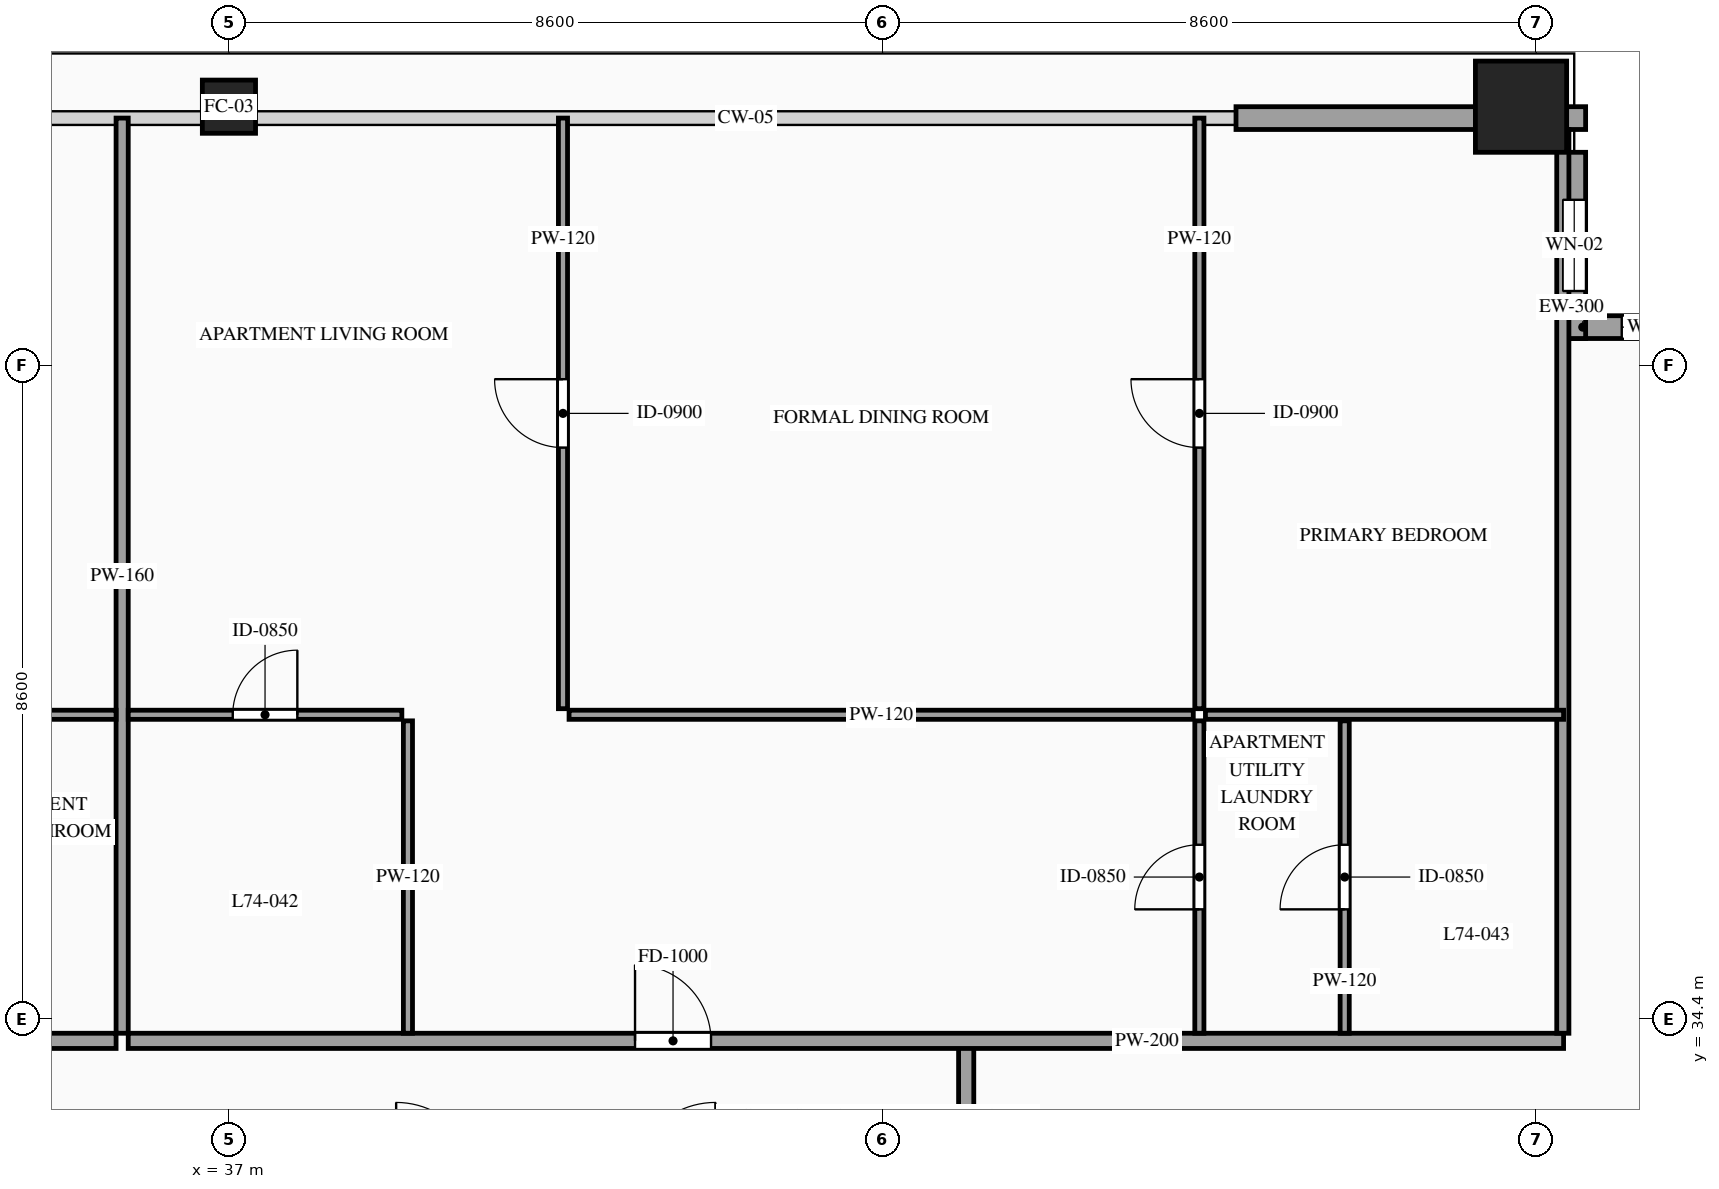
"""IFC4 building model, lengths in metres.
Left out: names, types, materials, properties, quantities, classifications, styles, units other than length and angle.
Written with IfcOpenShell. Run it as: python <this file> out.ifc"""

import sys

from ifc_helpers import new_model, si_unit, direction, frame, frame_2d, origin, origin_2d, place, context, subcontext, project, spatial, rectangle, hollow_rectangle, extrude, source, transform, mapped, element, fill, save


model = new_model("IFC4")
c1 = context("Model", 3, precision=1e-05, world=origin(), true_north=direction((0.0, 1.0)))
c2 = subcontext(c1, "Body", "Model", "MODEL_VIEW")
j1 = project(units=[si_unit("LENGTHUNIT", "METRE"), si_unit("PLANEANGLEUNIT", "RADIAN")], contexts=[c1])
p1 = place(None, origin())
s1 = spatial("IfcSite", under=j1, at=p1, CompositionType="ELEMENT")
p2 = place(p1, origin())
s2 = spatial("IfcBuilding", under=s1, at=p2, CompositionType="ELEMENT")
p3 = place(p2, frame((0.0, 0.0, 278.6)))
s3 = spatial("IfcBuildingStorey", under=s2, at=p3, CompositionType="ELEMENT", Elevation=278.6)
m1 = source(origin(), c2, "Body", "SweptSolid", [
    extrude(hollow_rectangle(XDim=0.7, YDim=0.7, WallThickness=0.032, at=origin_2d()), origin(), (0.0, 0.0, 1.0), 3.5),
])
p4 = place(p3, frame((37.0, 46.4, 0.0), z_axis=(0.0, 0.0, 1.0), x_axis=(1.0, 0.0, 0.0)))
e1 = element("IfcColumn", 1, at=p4, inside=s3, PredefinedType="COLUMN", context=c2, shape_type="MappedRepresentation", body=[
    mapped(m1, transform((0.0, 0.0, 0.0), scale=1.0)),
])
m2 = source(origin(), c2, "Body", "SweptSolid", [
    extrude(hollow_rectangle(XDim=1.2, YDim=1.2, WallThickness=0.055, at=origin_2d()), origin(), (0.0, 0.0, 1.0), 3.5),
])
p5 = place(p3, frame((54.0, 46.4, 0.0), z_axis=(0.0, 0.0, 1.0), x_axis=(1.0, 0.0, 0.0)))
e2 = element("IfcColumn", 2, at=p5, inside=s3, PredefinedType="COLUMN", context=c2, shape_type="MappedRepresentation", body=[
    mapped(m2, transform((0.0, 0.0, 0.0), scale=1.0)),
])
p6 = place(p3, frame((57.0, 43.5, 0.0), z_axis=(0.0, 0.0, 1.0), x_axis=(-1.0, 0.0, 0.0)))
e3 = element("IfcWall", 3, at=p6, inside=s3, PredefinedType="SOLIDWALL", context=c2, shape_type="SweptSolid", body=[
    extrude(rectangle(XDim=2.45, YDim=0.3, at=frame_2d((1.225, 0.0))), origin(), (0.0, 0.0, 1.0), 3.28),
])
p7 = place(p6, frame((0.775, 0.0, 0.85)))
e4 = element("IfcOpeningElement", 4, at=p7, cuts=e3, PredefinedType="OPENING", context=c2, shape_type="SweptSolid", body=[
    extrude(rectangle(XDim=0.9, YDim=1.5, at=frame_2d((0.45, 0.75))), frame((0.0, 0.165, 0.0), z_axis=(0.0, -1.0, 0.0), x_axis=(1.0, 0.0, 0.0)), (0.0, 0.0, 1.0), 0.33),
])
p8 = place(p3, frame((54.7, 43.35, 0.0), z_axis=(0.0, 0.0, 1.0), x_axis=(0.0, 1.0, 0.0)))
e5 = element("IfcWall", 5, at=p8, inside=s3, PredefinedType="SOLIDWALL", context=c2, shape_type="SweptSolid", body=[
    extrude(rectangle(XDim=2.45, YDim=0.3, at=frame_2d((1.225, 0.0))), origin(), (0.0, 0.0, 1.0), 3.28),
])
p9 = place(p8, frame((0.625, 0.0, 0.85)))
e6 = element("IfcOpeningElement", 6, at=p9, cuts=e5, PredefinedType="OPENING", context=c2, shape_type="SweptSolid", body=[
    extrude(rectangle(XDim=1.2, YDim=2.1, at=frame_2d((0.6, 1.05))), frame((0.0, 0.165, 0.0), z_axis=(0.0, -1.0, 0.0), x_axis=(1.0, 0.0, 0.0)), (0.0, 0.0, 1.0), 0.33),
])
m3 = source(origin(), c2, "Body", "SweptSolid", [
    extrude(rectangle(XDim=0.25, YDim=0.3, at=frame_2d((0.125, 0.0))), origin(), (0.0, 0.0, 1.0), 3.28),
])
p10 = place(p3, frame((54.6, 46.25, 0.0), z_axis=(0.0, 0.0, 1.0), x_axis=(1.0, 0.0, 0.0)))
e7 = element("IfcWall", 7, at=p10, inside=s3, PredefinedType="SOLIDWALL", context=c2, shape_type="MappedRepresentation", body=[
    mapped(m3, transform((0.0, 0.0, 0.0), scale=1.0)),
])
m4 = source(origin(), c2, "Body", "SweptSolid", [
    extrude(rectangle(XDim=3.15, YDim=0.3, at=frame_2d((1.575, 0.0))), origin(), (0.0, 0.0, 1.0), 2.835),
])
p11 = place(p3, frame((50.25, 46.25, 0.0), z_axis=(0.0, 0.0, 1.0), x_axis=(1.0, 0.0, 0.0)))
e8 = element("IfcWall", 8, at=p11, inside=s3, PredefinedType="SOLIDWALL", context=c2, shape_type="MappedRepresentation", body=[
    mapped(m4, transform((0.0, 0.0, 0.0), scale=1.0)),
])
m5 = source(origin(), c2, "Body", "SweptSolid", [
    extrude(rectangle(XDim=1.7, YDim=0.2, at=frame_2d((0.85, 0.0))), origin(), (0.0, 0.0, 1.0), 3.28),
])
p12 = place(p3, frame((46.7, 32.35, 0.0), z_axis=(0.0, 0.0, 1.0), x_axis=(0.0, 1.0, 0.0)))
e9 = element("IfcWall", 9, at=p12, inside=s3, PredefinedType="PARTITIONING", context=c2, shape_type="MappedRepresentation", body=[
    mapped(m5, transform((0.0, 0.0, 0.0), scale=1.0)),
])
p13 = place(p3, frame((19.44, 34.11, 0.0), z_axis=(0.0, 0.0, 1.0), x_axis=(1.0, 0.0, 0.0)))
e10 = element("IfcWall", 10, at=p13, inside=s3, PredefinedType="PARTITIONING", context=c2, shape_type="SweptSolid", body=[
    extrude(rectangle(XDim=16.075, YDim=0.2, at=frame_2d((8.038, 0.0))), origin(), (0.0, 0.0, 1.0), 3.28),
])
p14 = place(p13, frame((6.982, 0.0, 0.0)))
e11 = element("IfcOpeningElement", 11, at=p14, cuts=e10, PredefinedType="OPENING", context=c2, shape_type="SweptSolid", body=[
    extrude(rectangle(XDim=1.0, YDim=2.2, at=frame_2d((0.5, 1.1))), frame((0.0, 0.115, 0.0), z_axis=(0.0, -1.0, 0.0), x_axis=(1.0, 0.0, 0.0)), (0.0, 0.0, 1.0), 0.23),
])
m6 = source(origin(), c2, "Body", "SweptSolid", [
    extrude(rectangle(XDim=12.04, YDim=0.16, at=frame_2d((6.02, 0.0))), origin(), (0.0, 0.0, 1.0), 3.28),
])
p15 = place(p3, frame((35.595, 34.21, 0.0), z_axis=(0.0, 0.0, 1.0), x_axis=(0.0, 1.0, 0.0)))
e12 = element("IfcWall", 12, at=p15, inside=s3, PredefinedType="PARTITIONING", context=c2, shape_type="MappedRepresentation", body=[
    mapped(m6, transform((0.0, 0.0, 0.0), scale=1.0)),
])
m7 = source(origin(), c2, "Body", "SweptSolid", [
    extrude(rectangle(XDim=4.712, YDim=0.12, at=frame_2d((2.356, 0.0))), origin(), (0.0, 0.0, 1.0), 3.28),
])
p16 = place(p3, frame((30.803, 38.4, 0.0), z_axis=(0.0, 0.0, 1.0), x_axis=(1.0, 0.0, 0.0)))
e13 = element("IfcWall", 13, at=p16, inside=s3, PredefinedType="PARTITIONING", context=c2, shape_type="MappedRepresentation", body=[
    mapped(m7, transform((0.0, 0.0, 0.0), scale=1.0)),
])
p17 = place(p3, frame((35.675, 34.11, 0.0), z_axis=(0.0, 0.0, 1.0), x_axis=(1.0, 0.0, 0.0)))
e14 = element("IfcWall", 14, at=p17, inside=s3, PredefinedType="PARTITIONING", context=c2, shape_type="SweptSolid", body=[
    extrude(rectangle(XDim=18.885, YDim=0.2, at=frame_2d((9.442, 0.0))), origin(), (0.0, 0.0, 1.0), 3.28),
])
p18 = place(p17, frame((6.668, 0.0, 0.0)))
e15 = element("IfcOpeningElement", 15, at=p18, cuts=e14, PredefinedType="OPENING", context=c2, shape_type="SweptSolid", body=[
    extrude(rectangle(XDim=1.0, YDim=2.2, at=frame_2d((0.5, 1.1))), frame((0.0, 0.115, 0.0), z_axis=(0.0, -1.0, 0.0), x_axis=(1.0, 0.0, 0.0)), (0.0, 0.0, 1.0), 0.23),
])
m8 = source(origin(), c2, "Body", "SweptSolid", [
    extrude(rectangle(XDim=11.89, YDim=0.16, at=frame_2d((5.945, 0.0))), origin(), (0.0, 0.0, 1.0), 3.28),
])
p19 = place(p3, frame((54.55, 34.21, 0.0), z_axis=(0.0, 0.0, 1.0), x_axis=(0.0, 1.0, 0.0)))
e16 = element("IfcWall", 16, at=p19, inside=s3, PredefinedType="PARTITIONING", context=c2, shape_type="MappedRepresentation", body=[
    mapped(m8, transform((0.0, 0.0, 0.0), scale=1.0)),
])
p20 = place(p3, frame((35.675, 38.4, 0.0), z_axis=(0.0, 0.0, 1.0), x_axis=(1.0, 0.0, 0.0)))
e17 = element("IfcWall", 17, at=p20, inside=s3, PredefinedType="PARTITIONING", context=c2, shape_type="SweptSolid", body=[
    extrude(rectangle(XDim=3.6, YDim=0.12, at=frame_2d((1.8, 0.0))), origin(), (0.0, 0.0, 1.0), 3.28),
])
p21 = place(p20, frame((1.375, 0.0, 0.0)))
e18 = element("IfcOpeningElement", 18, at=p21, cuts=e17, PredefinedType="OPENING", context=c2, shape_type="SweptSolid", body=[
    extrude(rectangle(XDim=0.85, YDim=2.1, at=frame_2d((0.425, 1.05))), frame((0.0, 0.075, 0.0), z_axis=(0.0, -1.0, 0.0), x_axis=(1.0, 0.0, 0.0)), (0.0, 0.0, 1.0), 0.15),
])
m9 = source(origin(), c2, "Body", "SweptSolid", [
    extrude(rectangle(XDim=4.11, YDim=0.12, at=frame_2d((2.055, 0.0))), origin(), (0.0, 0.0, 1.0), 3.28),
])
p22 = place(p3, frame((39.355, 34.21, 0.0), z_axis=(0.0, 0.0, 1.0), x_axis=(0.0, 1.0, 0.0)))
e19 = element("IfcWall", 19, at=p22, inside=s3, PredefinedType="PARTITIONING", context=c2, shape_type="MappedRepresentation", body=[
    mapped(m9, transform((0.0, 0.0, 0.0), scale=1.0)),
])
p23 = place(p3, frame((51.68, 34.21, 0.0), z_axis=(0.0, 0.0, 1.0), x_axis=(0.0, 1.0, 0.0)))
e20 = element("IfcWall", 20, at=p23, inside=s3, PredefinedType="PARTITIONING", context=c2, shape_type="SweptSolid", body=[
    extrude(rectangle(XDim=4.11, YDim=0.12, at=frame_2d((2.055, 0.0))), origin(), (0.0, 0.0, 1.0), 3.28),
])
p24 = place(p23, frame((1.63, 0.0, 0.0)))
e21 = element("IfcOpeningElement", 21, at=p24, cuts=e20, PredefinedType="OPENING", context=c2, shape_type="SweptSolid", body=[
    extrude(rectangle(XDim=0.85, YDim=2.1, at=frame_2d((0.425, 1.05))), frame((0.0, 0.075, 0.0), z_axis=(0.0, -1.0, 0.0), x_axis=(1.0, 0.0, 0.0)), (0.0, 0.0, 1.0), 0.15),
])
m10 = source(origin(), c2, "Body", "SweptSolid", [
    extrude(rectangle(XDim=4.712, YDim=0.12, at=frame_2d((2.356, 0.0))), origin(), (0.0, 0.0, 1.0), 3.28),
])
p25 = place(p3, frame((49.848, 38.4, 0.0), z_axis=(0.0, 0.0, 1.0), x_axis=(1.0, 0.0, 0.0)))
e22 = element("IfcWall", 22, at=p25, inside=s3, PredefinedType="PARTITIONING", context=c2, shape_type="MappedRepresentation", body=[
    mapped(m10, transform((0.0, 0.0, 0.0), scale=1.0)),
])
p26 = place(p3, frame((49.768, 38.48, 0.0), z_axis=(0.0, 0.0, 1.0), x_axis=(0.0, 1.0, 0.0)))
e23 = element("IfcWall", 23, at=p26, inside=s3, PredefinedType="PARTITIONING", context=c2, shape_type="SweptSolid", body=[
    extrude(rectangle(XDim=7.77, YDim=0.12, at=frame_2d((3.885, 0.0))), origin(), (0.0, 0.0, 1.0), 3.28),
])
p27 = place(p26, frame((3.435, 0.0, 0.0)))
e24 = element("IfcOpeningElement", 24, at=p27, cuts=e23, PredefinedType="OPENING", context=c2, shape_type="SweptSolid", body=[
    extrude(rectangle(XDim=0.9, YDim=2.15, at=frame_2d((0.45, 1.075))), frame((0.0, 0.075, 0.0), z_axis=(0.0, -1.0, 0.0), x_axis=(1.0, 0.0, 0.0)), (0.0, 0.0, 1.0), 0.15),
])
p28 = place(p3, frame((49.768, 34.21, 0.0), z_axis=(0.0, 0.0, 1.0), x_axis=(0.0, 1.0, 0.0)))
e25 = element("IfcWall", 25, at=p28, inside=s3, PredefinedType="PARTITIONING", context=c2, shape_type="SweptSolid", body=[
    extrude(rectangle(XDim=4.11, YDim=0.12, at=frame_2d((2.055, 0.0))), origin(), (0.0, 0.0, 1.0), 3.28),
])
p29 = place(p28, frame((1.63, 0.0, 0.0)))
e26 = element("IfcOpeningElement", 26, at=p29, cuts=e25, PredefinedType="OPENING", context=c2, shape_type="SweptSolid", body=[
    extrude(rectangle(XDim=0.85, YDim=2.1, at=frame_2d((0.425, 1.05))), frame((0.0, 0.075, 0.0), z_axis=(0.0, -1.0, 0.0), x_axis=(1.0, 0.0, 0.0)), (0.0, 0.0, 1.0), 0.15),
])
m11 = source(origin(), c2, "Body", "SweptSolid", [
    extrude(rectangle(XDim=8.213, YDim=0.12, at=frame_2d((4.106, 0.0))), origin(), (0.0, 0.0, 1.0), 3.28),
])
p30 = place(p3, frame((41.475, 38.4, 0.0), z_axis=(0.0, 0.0, 1.0), x_axis=(1.0, 0.0, 0.0)))
e27 = element("IfcWall", 27, at=p30, inside=s3, PredefinedType="PARTITIONING", context=c2, shape_type="MappedRepresentation", body=[
    mapped(m11, transform((0.0, 0.0, 0.0), scale=1.0)),
])
p31 = place(p3, frame((41.395, 38.48, 0.0), z_axis=(0.0, 0.0, 1.0), x_axis=(0.0, 1.0, 0.0)))
e28 = element("IfcWall", 28, at=p31, inside=s3, PredefinedType="PARTITIONING", context=c2, shape_type="SweptSolid", body=[
    extrude(rectangle(XDim=7.77, YDim=0.12, at=frame_2d((3.885, 0.0))), origin(), (0.0, 0.0, 1.0), 3.28),
])
p32 = place(p31, frame((3.435, 0.0, 0.0)))
e29 = element("IfcOpeningElement", 29, at=p32, cuts=e28, PredefinedType="OPENING", context=c2, shape_type="SweptSolid", body=[
    extrude(rectangle(XDim=0.9, YDim=2.15, at=frame_2d((0.45, 1.075))), frame((0.0, 0.075, 0.0), z_axis=(0.0, -1.0, 0.0), x_axis=(1.0, 0.0, 0.0)), (0.0, 0.0, 1.0), 0.15),
])
m12 = source(origin(), c2, "Body", "SweptSolid", [
    extrude(rectangle(XDim=0.9, YDim=1.5, at=frame_2d((0.45, 0.75))), frame((0.0, 0.03, 0.0), z_axis=(0.0, -1.0, 0.0), x_axis=(1.0, 0.0, 0.0)), (0.0, 0.0, 1.0), 0.06),
])
p33 = place(p7, origin())
e30 = element("IfcWindow", 30, at=p33, inside=s3, PartitioningType="SINGLE_PANEL", PredefinedType="WINDOW", context=c2, shape_type="MappedRepresentation", body=[
    mapped(m12, transform((0.0, 0.0, 0.0), scale=1.0)),
])
fill(e4, e30)
m13 = source(origin(), c2, "Body", "SweptSolid", [
    extrude(rectangle(XDim=1.2, YDim=2.1, at=frame_2d((0.6, 1.05))), frame((0.0, 0.03, 0.0), z_axis=(0.0, -1.0, 0.0), x_axis=(1.0, 0.0, 0.0)), (0.0, 0.0, 1.0), 0.06),
])
p34 = place(p9, origin())
e31 = element("IfcWindow", 31, at=p34, inside=s3, PartitioningType="SINGLE_PANEL", PredefinedType="WINDOW", context=c2, shape_type="MappedRepresentation", body=[
    mapped(m13, transform((0.0, 0.0, 0.0), scale=1.0)),
])
fill(e6, e31)
m14 = source(origin(), c2, "Body", "SweptSolid", [
    extrude(rectangle(XDim=1.0, YDim=2.2, at=frame_2d((0.5, 1.1))), frame((0.0, 0.025, 0.0), z_axis=(0.0, -1.0, 0.0), x_axis=(1.0, 0.0, 0.0)), (0.0, 0.0, 1.0), 0.05),
])
p35 = place(p18, origin())
e32 = element("IfcDoor", 32, at=p35, inside=s3, OperationType="SINGLE_SWING_LEFT", PredefinedType="DOOR", context=c2, shape_type="MappedRepresentation", body=[
    mapped(m14, transform((0.0, 0.0, 0.0), scale=1.0)),
])
fill(e15, e32)
m15 = source(origin(), c2, "Body", "SweptSolid", [
    extrude(rectangle(XDim=0.85, YDim=2.1, at=frame_2d((0.425, 1.05))), frame((0.0, 0.025, 0.0), z_axis=(0.0, -1.0, 0.0), x_axis=(1.0, 0.0, 0.0)), (0.0, 0.0, 1.0), 0.05),
])
p36 = place(p21, origin())
e33 = element("IfcDoor", 33, at=p36, inside=s3, OperationType="SINGLE_SWING_RIGHT", PredefinedType="DOOR", context=c2, shape_type="MappedRepresentation", body=[
    mapped(m15, transform((0.0, 0.0, 0.0), scale=1.0)),
])
fill(e18, e33)
p37 = place(p24, origin())
e34 = element("IfcDoor", 34, at=p37, inside=s3, OperationType="SINGLE_SWING_LEFT", PredefinedType="DOOR", context=c2, shape_type="MappedRepresentation", body=[
    mapped(m15, transform((0.0, 0.0, 0.0), scale=1.0)),
])
fill(e21, e34)
m16 = source(origin(), c2, "Body", "SweptSolid", [
    extrude(rectangle(XDim=0.9, YDim=2.15, at=frame_2d((0.45, 1.075))), frame((0.0, 0.025, 0.0), z_axis=(0.0, -1.0, 0.0), x_axis=(1.0, 0.0, 0.0)), (0.0, 0.0, 1.0), 0.05),
])
p38 = place(p27, origin())
e35 = element("IfcDoor", 35, at=p38, inside=s3, OperationType="SINGLE_SWING_RIGHT", PredefinedType="DOOR", context=c2, shape_type="MappedRepresentation", body=[
    mapped(m16, transform((0.0, 0.0, 0.0), scale=1.0)),
])
fill(e24, e35)
p39 = place(p29, origin())
e36 = element("IfcDoor", 36, at=p39, inside=s3, OperationType="SINGLE_SWING_LEFT", PredefinedType="DOOR", context=c2, shape_type="MappedRepresentation", body=[
    mapped(m15, transform((0.0, 0.0, 0.0), scale=1.0)),
])
fill(e26, e36)
p40 = place(p32, origin())
e37 = element("IfcDoor", 37, at=p40, inside=s3, OperationType="SINGLE_SWING_RIGHT", PredefinedType="DOOR", context=c2, shape_type="MappedRepresentation", body=[
    mapped(m16, transform((0.0, 0.0, 0.0), scale=1.0)),
])
fill(e29, e37)
save(model, sys.argv[1])
